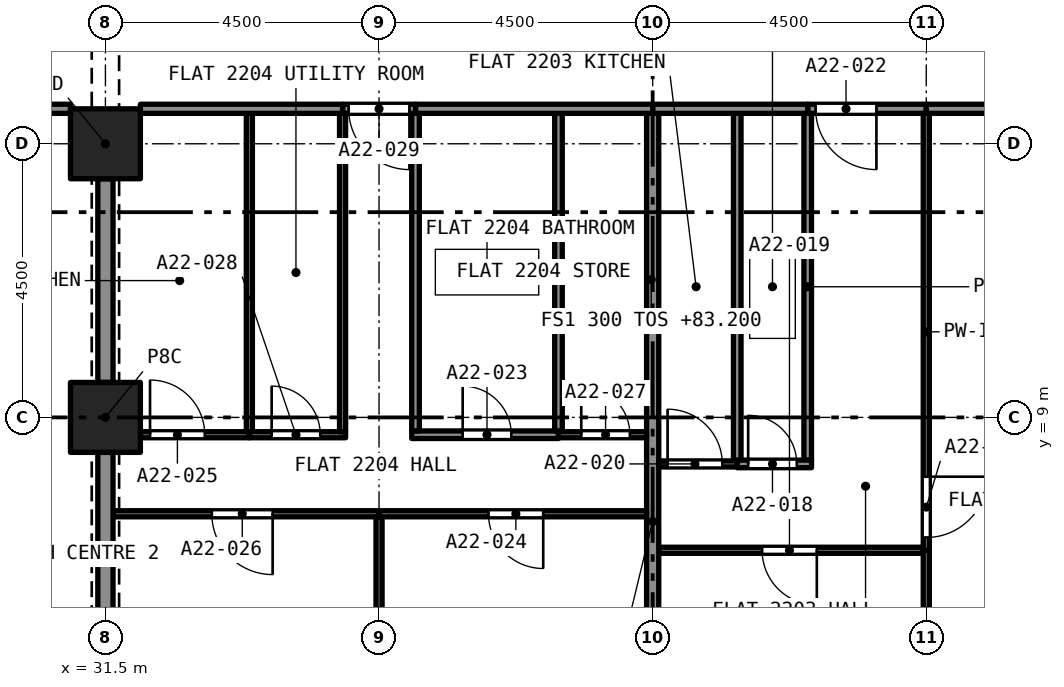
"""IFC4 building model, lengths in metres.
Left out: names, types, materials, properties, quantities, classifications, styles, units other than length and angle.
Written with IfcOpenShell. Run it as: python <this file> out.ifc"""

import sys

from ifc_helpers import new_model, si_unit, direction, frame, frame_2d, origin, origin_2d, place, context, subcontext, project, spatial, rectangle, extrude, element, fill, save


model = new_model("IFC4")
c1 = context("Model", 3, precision=1e-05, world=origin(), true_north=direction((0.0, 1.0)))
c2 = subcontext(c1, "Body", "Model", "MODEL_VIEW")
j1 = project(units=[si_unit("LENGTHUNIT", "METRE"), si_unit("PLANEANGLEUNIT", "RADIAN")], contexts=[c1])
p1 = place(None, origin())
s1 = spatial("IfcSite", under=j1, at=p1, CompositionType="ELEMENT")
p2 = place(p1, origin())
s2 = spatial("IfcBuilding", under=s1, at=p2, CompositionType="ELEMENT")
p3 = place(p2, frame((0.0, 0.0, 83.2)))
s3 = spatial("IfcBuildingStorey", under=s2, at=p3, CompositionType="ELEMENT", Elevation=83.2)
for number, where, z_axis, x_axis in (
    (1, (31.5, 9.0, 0.0), (0.0, 0.0, 1.0), (1.0, 0.0, 0.0)),
    (2, (31.5, 13.5, 0.0), (0.0, 0.0, 1.0), (1.0, 0.0, 0.0)),
):
    element("IfcColumn", number, at=place(p3, frame(where, z_axis=z_axis, x_axis=x_axis)), inside=s3, PredefinedType="COLUMN", context=c2, shape_type="SweptSolid", body=[
        extrude(rectangle(XDim=1.15, YDim=1.15, at=origin_2d()), origin(), (0.0, 0.0, 1.0), 3.2),
    ])
p4 = place(p3, frame((43.05, 8.298, 0.0), z_axis=(0.0, 0.0, 1.0), x_axis=(0.0, 1.0, 0.0)))
e3 = element("IfcWall", 3, at=p4, inside=s3, PredefinedType="PARTITIONING", context=c2, shape_type="SweptSolid", body=[
    extrude(rectangle(XDim=5.702, YDim=0.125, at=frame_2d((2.851, 0.0))), origin(), (0.0, 0.0, 1.0), 2.9),
])
p5 = place(p3, frame((41.891, 8.235, 0.0), z_axis=(0.0, 0.0, 1.0), x_axis=(1.0, 0.0, 0.0)))
e4 = element("IfcWall", 4, at=p5, inside=s3, PredefinedType="PARTITIONING", context=c2, shape_type="SweptSolid", body=[
    extrude(rectangle(XDim=1.222, YDim=0.125, at=frame_2d((0.611, 0.0))), origin(), (0.0, 0.0, 1.0), 2.9),
])
p6 = place(p5, frame((0.179, 0.0, 0.0)))
e5 = element("IfcOpeningElement", 5, at=p6, cuts=e4, PredefinedType="OPENING", context=c2, shape_type="SweptSolid", body=[
    extrude(rectangle(XDim=0.8, YDim=2.1, at=frame_2d((0.4, 1.05))), frame((0.0, 0.073, 0.0), z_axis=(0.0, -1.0, 0.0), x_axis=(1.0, 0.0, 0.0)), (0.0, 0.0, 1.0), 0.145),
])
p7 = place(p3, frame((41.891, 8.298, 0.0), z_axis=(0.0, 0.0, 1.0), x_axis=(0.0, 1.0, 0.0)))
e6 = element("IfcWall", 6, at=p7, inside=s3, PredefinedType="PARTITIONING", context=c2, shape_type="SweptSolid", body=[
    extrude(rectangle(XDim=5.702, YDim=0.125, at=frame_2d((2.851, 0.0))), origin(), (0.0, 0.0, 1.0), 2.9),
])
p8 = place(p3, frame((44.95, 6.815, 0.0), z_axis=(0.0, 0.0, 1.0), x_axis=(-1.0, 0.0, 0.0)))
e7 = element("IfcWall", 7, at=p8, inside=s3, PredefinedType="PARTITIONING", context=c2, shape_type="SweptSolid", body=[
    extrude(rectangle(XDim=4.35, YDim=0.1, at=frame_2d((2.175, 0.0))), origin(), (0.0, 0.0, 1.0), 2.9),
])
p9 = place(p8, frame((1.75, 0.0, 0.0)))
e8 = element("IfcOpeningElement", 8, at=p9, cuts=e7, PredefinedType="OPENING", context=c2, shape_type="SweptSolid", body=[
    extrude(rectangle(XDim=0.9, YDim=2.1, at=frame_2d((0.45, 1.05))), frame((0.0, 0.06, 0.0), z_axis=(0.0, -1.0, 0.0), x_axis=(1.0, 0.0, 0.0)), (0.0, 0.0, 1.0), 0.12),
])
p10 = place(p3, frame((45.0, 0.622, 0.0), z_axis=(0.0, 0.0, 1.0), x_axis=(0.0, 1.0, 0.0)))
e9 = element("IfcWall", 9, at=p10, inside=s3, PredefinedType="PARTITIONING", context=c2, shape_type="SweptSolid", body=[
    extrude(rectangle(XDim=6.193, YDim=0.1, at=frame_2d((3.096, 0.0))), origin(), (0.0, 0.0, 1.0), 2.9),
])
p11 = place(p3, frame((40.5, 0.575, 0.0), z_axis=(0.0, 0.0, 1.0), x_axis=(0.0, 1.0, 0.0)))
e10 = element("IfcWall", 10, at=p11, inside=s3, PredefinedType="PARTITIONING", context=c2, shape_type="SweptSolid", body=[
    extrude(rectangle(XDim=13.425, YDim=0.2, at=frame_2d((6.712, 0.0))), origin(), (0.0, 0.0, 1.0), 2.9),
])
p12 = place(p3, frame((40.6, 8.235, 0.0), z_axis=(0.0, 0.0, 1.0), x_axis=(1.0, 0.0, 0.0)))
e11 = element("IfcWall", 11, at=p12, inside=s3, PredefinedType="PARTITIONING", context=c2, shape_type="SweptSolid", body=[
    extrude(rectangle(XDim=1.291, YDim=0.1, at=frame_2d((0.646, 0.0))), origin(), (0.0, 0.0, 1.0), 2.9),
])
p13 = place(p12, frame((0.146, 0.0, 0.0)))
e12 = element("IfcOpeningElement", 12, at=p13, cuts=e11, PredefinedType="OPENING", context=c2, shape_type="SweptSolid", body=[
    extrude(rectangle(XDim=0.9, YDim=2.1, at=frame_2d((0.45, 1.05))), frame((0.0, 0.06, 0.0), z_axis=(0.0, -1.0, 0.0), x_axis=(1.0, 0.0, 0.0)), (0.0, 0.0, 1.0), 0.12),
])
p14 = place(p3, frame((45.0, 14.0, 0.0), z_axis=(0.0, 0.0, 1.0), x_axis=(0.0, -1.0, 0.0)))
e13 = element("IfcWall", 13, at=p14, inside=s3, PredefinedType="PARTITIONING", context=c2, shape_type="SweptSolid", body=[
    extrude(rectangle(XDim=7.185, YDim=0.1, at=frame_2d((3.593, 0.0))), origin(), (0.0, 0.0, 1.0), 2.9),
])
p15 = place(p14, frame((5.975, 0.0, 0.0)))
e14 = element("IfcOpeningElement", 14, at=p15, cuts=e13, PredefinedType="OPENING", context=c2, shape_type="SweptSolid", body=[
    extrude(rectangle(XDim=1.0, YDim=2.1, at=frame_2d((0.5, 1.05))), frame((0.0, 0.06, 0.0), z_axis=(0.0, -1.0, 0.0), x_axis=(1.0, 0.0, 0.0)), (0.0, 0.0, 1.0), 0.12),
])
p16 = place(p3, frame((45.0, 14.075, 0.0), z_axis=(0.0, 0.0, 1.0), x_axis=(-1.0, 0.0, 0.0)))
e15 = element("IfcWall", 15, at=p16, inside=s3, PredefinedType="PARTITIONING", context=c2, shape_type="SweptSolid", body=[
    extrude(rectangle(XDim=1.95, YDim=0.15, at=frame_2d((0.975, 0.0))), origin(), (0.0, 0.0, 1.0), 2.9),
])
p17 = place(p16, frame((0.82, 0.0, 0.0)))
e16 = element("IfcOpeningElement", 16, at=p17, cuts=e15, PredefinedType="OPENING", context=c2, shape_type="SweptSolid", body=[
    extrude(rectangle(XDim=1.0, YDim=2.1, at=frame_2d((0.5, 1.05))), frame((0.0, 0.085, 0.0), z_axis=(0.0, -1.0, 0.0), x_axis=(1.0, 0.0, 0.0)), (0.0, 0.0, 1.0), 0.17),
])
p18 = place(p3, frame((40.5, 14.075, 0.0), z_axis=(0.0, 0.0, 1.0), x_axis=(1.0, 0.0, 0.0)))
e17 = element("IfcWall", 17, at=p18, inside=s3, PredefinedType="PARTITIONING", context=c2, shape_type="SweptSolid", body=[
    extrude(rectangle(XDim=2.55, YDim=0.15, at=frame_2d((1.275, 0.0))), origin(), (0.0, 0.0, 1.0), 2.9),
])
p19 = place(p3, frame((45.0, 14.075, 0.0), z_axis=(0.0, 0.0, 1.0), x_axis=(1.0, 0.0, 0.0)))
e18 = element("IfcWall", 18, at=p19, inside=s3, PredefinedType="PARTITIONING", context=c2, shape_type="SweptSolid", body=[
    extrude(rectangle(XDim=3.925, YDim=0.15, at=frame_2d((1.962, 0.0))), origin(), (0.0, 0.0, 1.0), 2.9),
])
p20 = place(p3, frame((36.538, 8.715, 0.0), z_axis=(0.0, 0.0, 1.0), x_axis=(1.0, 0.0, 0.0)))
e19 = element("IfcWall", 19, at=p20, inside=s3, PredefinedType="PARTITIONING", context=c2, shape_type="SweptSolid", body=[
    extrude(rectangle(XDim=2.414, YDim=0.125, at=frame_2d((1.207, 0.0))), origin(), (0.0, 0.0, 1.0), 2.9),
])
p21 = place(p20, frame((0.838, 0.0, 0.0)))
e20 = element("IfcOpeningElement", 20, at=p21, cuts=e19, PredefinedType="OPENING", context=c2, shape_type="SweptSolid", body=[
    extrude(rectangle(XDim=0.8, YDim=2.1, at=frame_2d((0.4, 1.05))), frame((0.0, 0.073, 0.0), z_axis=(0.0, -1.0, 0.0), x_axis=(1.0, 0.0, 0.0)), (0.0, 0.0, 1.0), 0.145),
])
for number, where, z_axis, x_axis in (
    (21, (36.6, 8.778, 0.0), (0.0, 0.0, 1.0), (0.0, 1.0, 0.0)),
    (22, (38.951, 8.778, 0.0), (0.0, 0.0, 1.0), (0.0, 1.0, 0.0)),
):
    element("IfcWall", number, at=place(p3, frame(where, z_axis=z_axis, x_axis=x_axis)), inside=s3, PredefinedType="PARTITIONING", context=c2, shape_type="SweptSolid", body=[
        extrude(rectangle(XDim=5.222, YDim=0.125, at=frame_2d((2.611, 0.0))), origin(), (0.0, 0.0, 1.0), 2.9),
    ])
p22 = place(p3, frame((36.6, 14.075, 0.0), z_axis=(0.0, 0.0, 1.0), x_axis=(1.0, 0.0, 0.0)))
e23 = element("IfcWall", 23, at=p22, inside=s3, PredefinedType="PARTITIONING", context=c2, shape_type="SweptSolid", body=[
    extrude(rectangle(XDim=3.9, YDim=0.15, at=frame_2d((1.95, 0.0))), origin(), (0.0, 0.0, 1.0), 2.9),
])
p23 = place(p3, frame((40.4, 7.415, 0.0), z_axis=(0.0, 0.0, 1.0), x_axis=(-1.0, 0.0, 0.0)))
e24 = element("IfcWall", 24, at=p23, inside=s3, PredefinedType="PARTITIONING", context=c2, shape_type="SweptSolid", body=[
    extrude(rectangle(XDim=4.4, YDim=0.1, at=frame_2d((2.2, 0.0))), origin(), (0.0, 0.0, 1.0), 2.9),
])
p24 = place(p23, frame((1.7, 0.0, 0.0)))
e25 = element("IfcOpeningElement", 25, at=p24, cuts=e24, PredefinedType="OPENING", context=c2, shape_type="SweptSolid", body=[
    extrude(rectangle(XDim=0.9, YDim=2.1, at=frame_2d((0.45, 1.05))), frame((0.0, 0.06, 0.0), z_axis=(0.0, -1.0, 0.0), x_axis=(1.0, 0.0, 0.0)), (0.0, 0.0, 1.0), 0.12),
])
p25 = place(p3, frame((36.0, 0.575, 0.0), z_axis=(0.0, 0.0, 1.0), x_axis=(0.0, 1.0, 0.0)))
e26 = element("IfcWall", 26, at=p25, inside=s3, PredefinedType="PARTITIONING", context=c2, shape_type="SweptSolid", body=[
    extrude(rectangle(XDim=6.79, YDim=0.1, at=frame_2d((3.395, 0.0))), origin(), (0.0, 0.0, 1.0), 2.9),
])
p26 = place(p3, frame((32.075, 8.715, 0.0), z_axis=(0.0, 0.0, 1.0), x_axis=(1.0, 0.0, 0.0)))
e27 = element("IfcWall", 27, at=p26, inside=s3, PredefinedType="PARTITIONING", context=c2, shape_type="SweptSolid", body=[
    extrude(rectangle(XDim=1.792, YDim=0.1, at=frame_2d((0.896, 0.0))), origin(), (0.0, 0.0, 1.0), 2.9),
])
p27 = place(p26, frame((0.159, 0.0, 0.0)))
e28 = element("IfcOpeningElement", 28, at=p27, cuts=e27, PredefinedType="OPENING", context=c2, shape_type="SweptSolid", body=[
    extrude(rectangle(XDim=0.9, YDim=2.1, at=frame_2d((0.45, 1.05))), frame((0.0, 0.06, 0.0), z_axis=(0.0, -1.0, 0.0), x_axis=(1.0, 0.0, 0.0)), (0.0, 0.0, 1.0), 0.12),
])
p28 = place(p3, frame((36.0, 7.415, 0.0), z_axis=(0.0, 0.0, 1.0), x_axis=(-1.0, 0.0, 0.0)))
e29 = element("IfcWall", 29, at=p28, inside=s3, PredefinedType="PARTITIONING", context=c2, shape_type="SweptSolid", body=[
    extrude(rectangle(XDim=4.375, YDim=0.1, at=frame_2d((2.188, 0.0))), origin(), (0.0, 0.0, 1.0), 2.9),
])
p29 = place(p28, frame((1.75, 0.0, 0.0)))
e30 = element("IfcOpeningElement", 30, at=p29, cuts=e29, PredefinedType="OPENING", context=c2, shape_type="SweptSolid", body=[
    extrude(rectangle(XDim=1.0, YDim=2.1, at=frame_2d((0.5, 1.05))), frame((0.0, 0.06, 0.0), z_axis=(0.0, -1.0, 0.0), x_axis=(1.0, 0.0, 0.0)), (0.0, 0.0, 1.0), 0.12),
])
p30 = place(p3, frame((38.951, 8.715, 0.0), z_axis=(0.0, 0.0, 1.0), x_axis=(1.0, 0.0, 0.0)))
e31 = element("IfcWall", 31, at=p30, inside=s3, PredefinedType="PARTITIONING", context=c2, shape_type="SweptSolid", body=[
    extrude(rectangle(XDim=1.449, YDim=0.1, at=frame_2d((0.724, 0.0))), origin(), (0.0, 0.0, 1.0), 2.9),
])
p31 = place(p30, frame((0.375, 0.0, 0.0)))
e32 = element("IfcOpeningElement", 32, at=p31, cuts=e31, PredefinedType="OPENING", context=c2, shape_type="SweptSolid", body=[
    extrude(rectangle(XDim=0.8, YDim=2.1, at=frame_2d((0.4, 1.05))), frame((0.0, 0.06, 0.0), z_axis=(0.0, -1.0, 0.0), x_axis=(1.0, 0.0, 0.0)), (0.0, 0.0, 1.0), 0.12),
])
p32 = place(p3, frame((33.867, 8.715, 0.0), z_axis=(0.0, 0.0, 1.0), x_axis=(1.0, 0.0, 0.0)))
e33 = element("IfcWall", 33, at=p32, inside=s3, PredefinedType="PARTITIONING", context=c2, shape_type="SweptSolid", body=[
    extrude(rectangle(XDim=1.583, YDim=0.1, at=frame_2d((0.791, 0.0))), origin(), (0.0, 0.0, 1.0), 2.9),
])
p33 = place(p32, frame((0.366, 0.0, 0.0)))
e34 = element("IfcOpeningElement", 34, at=p33, cuts=e33, PredefinedType="OPENING", context=c2, shape_type="SweptSolid", body=[
    extrude(rectangle(XDim=0.8, YDim=2.1, at=frame_2d((0.4, 1.05))), frame((0.0, 0.06, 0.0), z_axis=(0.0, -1.0, 0.0), x_axis=(1.0, 0.0, 0.0)), (0.0, 0.0, 1.0), 0.12),
])
p34 = place(p3, frame((35.4, 8.765, 0.0), z_axis=(0.0, 0.0, 1.0), x_axis=(0.0, 1.0, 0.0)))
e35 = element("IfcWall", 35, at=p34, inside=s3, PredefinedType="PARTITIONING", context=c2, shape_type="SweptSolid", body=[
    extrude(rectangle(XDim=5.235, YDim=0.1, at=frame_2d((2.618, 0.0))), origin(), (0.0, 0.0, 1.0), 2.9),
])
p35 = place(p3, frame((36.6, 14.075, 0.0), z_axis=(0.0, 0.0, 1.0), x_axis=(-1.0, 0.0, 0.0)))
e36 = element("IfcWall", 36, at=p35, inside=s3, PredefinedType="PARTITIONING", context=c2, shape_type="SweptSolid", body=[
    extrude(rectangle(XDim=1.2, YDim=0.15, at=frame_2d((0.6, 0.0))), origin(), (0.0, 0.0, 1.0), 2.9),
])
p36 = place(p35, frame((0.1, 0.0, 0.0)))
e37 = element("IfcOpeningElement", 37, at=p36, cuts=e36, PredefinedType="OPENING", context=c2, shape_type="SweptSolid", body=[
    extrude(rectangle(XDim=1.0, YDim=2.1, at=frame_2d((0.5, 1.05))), frame((0.0, 0.085, 0.0), z_axis=(0.0, -1.0, 0.0), x_axis=(1.0, 0.0, 0.0)), (0.0, 0.0, 1.0), 0.17),
])
p37 = place(p3, frame((33.867, 8.765, 0.0), z_axis=(0.0, 0.0, 1.0), x_axis=(0.0, 1.0, 0.0)))
e38 = element("IfcWall", 38, at=p37, inside=s3, PredefinedType="PARTITIONING", context=c2, shape_type="SweptSolid", body=[
    extrude(rectangle(XDim=5.235, YDim=0.1, at=frame_2d((2.618, 0.0))), origin(), (0.0, 0.0, 1.0), 2.9),
])
p38 = place(p3, frame((31.5, 9.575, 0.0), z_axis=(0.0, 0.0, 1.0), x_axis=(0.0, 1.0, 0.0)))
e39 = element("IfcWall", 39, at=p38, inside=s3, PredefinedType="PARTITIONING", context=c2, shape_type="SweptSolid", body=[
    extrude(rectangle(XDim=3.35, YDim=0.25, at=frame_2d((1.675, 0.0))), origin(), (0.0, 0.0, 1.0), 2.38),
])
p39 = place(p3, frame((32.075, 14.075, 0.0), z_axis=(0.0, 0.0, 1.0), x_axis=(1.0, 0.0, 0.0)))
e40 = element("IfcWall", 40, at=p39, inside=s3, PredefinedType="PARTITIONING", context=c2, shape_type="SweptSolid", body=[
    extrude(rectangle(XDim=3.325, YDim=0.15, at=frame_2d((1.663, 0.0))), origin(), (0.0, 0.0, 1.0), 2.9),
])
p40 = place(p3, frame((31.5, 5.075, 0.0), z_axis=(0.0, 0.0, 1.0), x_axis=(0.0, 1.0, 0.0)))
e41 = element("IfcWall", 41, at=p40, inside=s3, PredefinedType="PARTITIONING", context=c2, shape_type="SweptSolid", body=[
    extrude(rectangle(XDim=3.35, YDim=0.25, at=frame_2d((1.675, 0.0))), origin(), (0.0, 0.0, 1.0), 2.38),
])
p41 = place(p3, frame((30.925, 14.075, 0.0), z_axis=(0.0, 0.0, 1.0), x_axis=(-1.0, 0.0, 0.0)))
e42 = element("IfcWall", 42, at=p41, inside=s3, PredefinedType="PARTITIONING", context=c2, shape_type="SweptSolid", body=[
    extrude(rectangle(XDim=3.925, YDim=0.15, at=frame_2d((1.962, 0.0))), origin(), (0.0, 0.0, 1.0), 2.75),
])
p42 = place(p41, frame((1.175, 0.0, 0.0)))
e43 = element("IfcOpeningElement", 43, at=p42, cuts=e42, PredefinedType="OPENING", context=c2, shape_type="SweptSolid", body=[
    extrude(rectangle(XDim=1.0, YDim=2.1, at=frame_2d((0.5, 1.05))), frame((0.0, 0.085, 0.0), z_axis=(0.0, -1.0, 0.0), x_axis=(1.0, 0.0, 0.0)), (0.0, 0.0, 1.0), 0.17),
])
p43 = place(p6, origin())
e44 = element("IfcDoor", 44, at=p43, inside=s3, OperationType="SINGLE_SWING_LEFT", PredefinedType="DOOR", context=c2, shape_type="SweptSolid", body=[
    extrude(rectangle(XDim=0.8, YDim=2.1, at=frame_2d((0.4, 1.05))), frame((0.0, 0.025, 0.0), z_axis=(0.0, -1.0, 0.0), x_axis=(1.0, 0.0, 0.0)), (0.0, 0.0, 1.0), 0.05),
])
fill(e5, e44)
p44 = place(p9, origin())
e45 = element("IfcDoor", 45, at=p44, inside=s3, OperationType="SINGLE_SWING_RIGHT", PredefinedType="DOOR", context=c2, shape_type="SweptSolid", body=[
    extrude(rectangle(XDim=0.9, YDim=2.1, at=frame_2d((0.45, 1.05))), frame((0.0, 0.025, 0.0), z_axis=(0.0, -1.0, 0.0), x_axis=(1.0, 0.0, 0.0)), (0.0, 0.0, 1.0), 0.05),
])
fill(e8, e45)
p45 = place(p13, origin())
e46 = element("IfcDoor", 46, at=p45, inside=s3, OperationType="SINGLE_SWING_LEFT", PredefinedType="DOOR", context=c2, shape_type="SweptSolid", body=[
    extrude(rectangle(XDim=0.9, YDim=2.1, at=frame_2d((0.45, 1.05))), frame((0.0, 0.025, 0.0), z_axis=(0.0, -1.0, 0.0), x_axis=(1.0, 0.0, 0.0)), (0.0, 0.0, 1.0), 0.05),
])
fill(e12, e46)
p46 = place(p15, origin())
e47 = element("IfcDoor", 47, at=p46, inside=s3, OperationType="SINGLE_SWING_RIGHT", PredefinedType="DOOR", context=c2, shape_type="SweptSolid", body=[
    extrude(rectangle(XDim=1.0, YDim=2.1, at=frame_2d((0.5, 1.05))), frame((0.0, 0.025, 0.0), z_axis=(0.0, -1.0, 0.0), x_axis=(1.0, 0.0, 0.0)), (0.0, 0.0, 1.0), 0.05),
])
fill(e14, e47)
p47 = place(p17, origin())
e48 = element("IfcDoor", 48, at=p47, inside=s3, OperationType="SINGLE_SWING_RIGHT", PredefinedType="DOOR", context=c2, shape_type="SweptSolid", body=[
    extrude(rectangle(XDim=1.0, YDim=2.1, at=frame_2d((0.5, 1.05))), frame((0.0, 0.025, 0.0), z_axis=(0.0, -1.0, 0.0), x_axis=(1.0, 0.0, 0.0)), (0.0, 0.0, 1.0), 0.05),
])
fill(e16, e48)
p48 = place(p21, origin())
e49 = element("IfcDoor", 49, at=p48, inside=s3, OperationType="SINGLE_SWING_RIGHT", PredefinedType="DOOR", context=c2, shape_type="SweptSolid", body=[
    extrude(rectangle(XDim=0.8, YDim=2.1, at=frame_2d((0.4, 1.05))), frame((0.0, 0.025, 0.0), z_axis=(0.0, -1.0, 0.0), x_axis=(1.0, 0.0, 0.0)), (0.0, 0.0, 1.0), 0.05),
])
fill(e20, e49)
p49 = place(p24, origin())
e50 = element("IfcDoor", 50, at=p49, inside=s3, OperationType="SINGLE_SWING_LEFT", PredefinedType="DOOR", context=c2, shape_type="SweptSolid", body=[
    extrude(rectangle(XDim=0.9, YDim=2.1, at=frame_2d((0.45, 1.05))), frame((0.0, 0.025, 0.0), z_axis=(0.0, -1.0, 0.0), x_axis=(1.0, 0.0, 0.0)), (0.0, 0.0, 1.0), 0.05),
])
fill(e25, e50)
p50 = place(p27, origin())
e51 = element("IfcDoor", 51, at=p50, inside=s3, OperationType="SINGLE_SWING_LEFT", PredefinedType="DOOR", context=c2, shape_type="SweptSolid", body=[
    extrude(rectangle(XDim=0.9, YDim=2.1, at=frame_2d((0.45, 1.05))), frame((0.0, 0.025, 0.0), z_axis=(0.0, -1.0, 0.0), x_axis=(1.0, 0.0, 0.0)), (0.0, 0.0, 1.0), 0.05),
])
fill(e28, e51)
p51 = place(p29, origin())
e52 = element("IfcDoor", 52, at=p51, inside=s3, OperationType="SINGLE_SWING_RIGHT", PredefinedType="DOOR", context=c2, shape_type="SweptSolid", body=[
    extrude(rectangle(XDim=1.0, YDim=2.1, at=frame_2d((0.5, 1.05))), frame((0.0, 0.025, 0.0), z_axis=(0.0, -1.0, 0.0), x_axis=(1.0, 0.0, 0.0)), (0.0, 0.0, 1.0), 0.05),
])
fill(e30, e52)
p52 = place(p31, origin())
e53 = element("IfcDoor", 53, at=p52, inside=s3, OperationType="SINGLE_SWING_RIGHT", PredefinedType="DOOR", context=c2, shape_type="SweptSolid", body=[
    extrude(rectangle(XDim=0.8, YDim=2.1, at=frame_2d((0.4, 1.05))), frame((0.0, 0.025, 0.0), z_axis=(0.0, -1.0, 0.0), x_axis=(1.0, 0.0, 0.0)), (0.0, 0.0, 1.0), 0.05),
])
fill(e32, e53)
p53 = place(p33, origin())
e54 = element("IfcDoor", 54, at=p53, inside=s3, OperationType="SINGLE_SWING_LEFT", PredefinedType="DOOR", context=c2, shape_type="SweptSolid", body=[
    extrude(rectangle(XDim=0.8, YDim=2.1, at=frame_2d((0.4, 1.05))), frame((0.0, 0.025, 0.0), z_axis=(0.0, -1.0, 0.0), x_axis=(1.0, 0.0, 0.0)), (0.0, 0.0, 1.0), 0.05),
])
fill(e34, e54)
p54 = place(p36, origin())
e55 = element("IfcDoor", 55, at=p54, inside=s3, OperationType="SINGLE_SWING_RIGHT", PredefinedType="DOOR", context=c2, shape_type="SweptSolid", body=[
    extrude(rectangle(XDim=1.0, YDim=2.1, at=frame_2d((0.5, 1.05))), frame((0.0, 0.025, 0.0), z_axis=(0.0, -1.0, 0.0), x_axis=(1.0, 0.0, 0.0)), (0.0, 0.0, 1.0), 0.05),
])
fill(e37, e55)
save(model, sys.argv[1])
